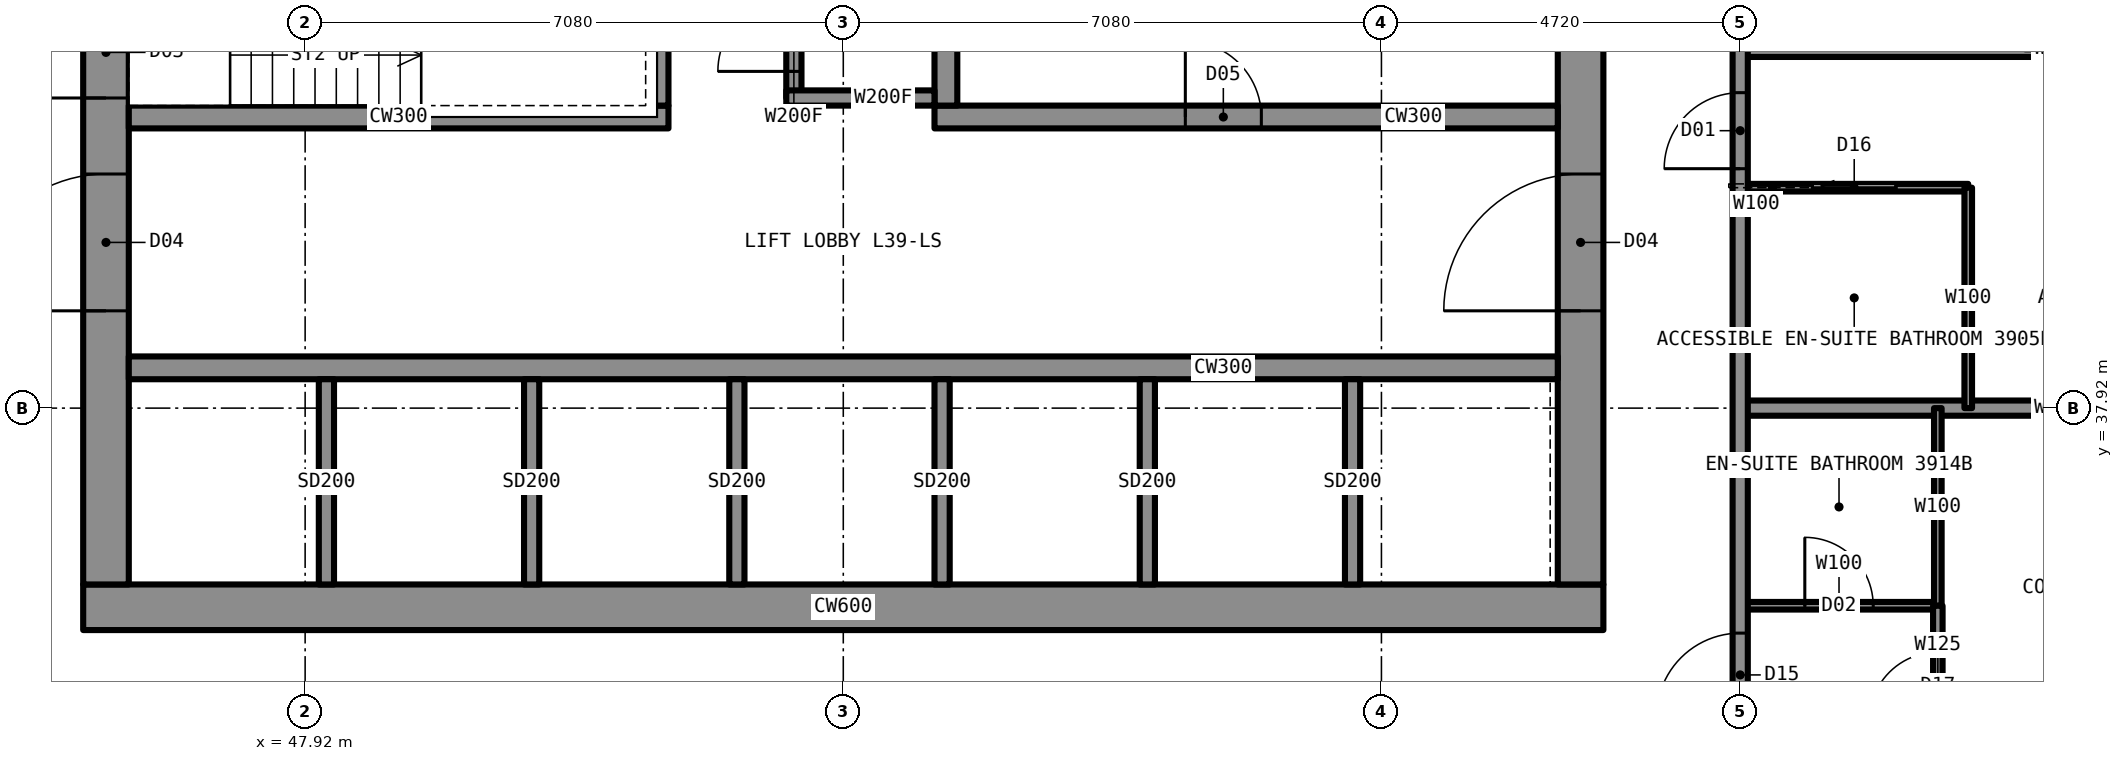
"""IFC4 building model, lengths in metres.
Left out: names, types, materials, properties, quantities, classifications, styles, units other than length and angle.
Written with IfcOpenShell. Run it as: python <this file> out.ifc"""

import sys

from ifc_helpers import new_model, si_unit, direction, frame, frame_2d, origin, place, context, subcontext, project, spatial, rectangle, extrude, element, fill, save


model = new_model("IFC4")
c1 = context("Model", 3, precision=1e-05, world=origin(), true_north=direction((0.0, 1.0)))
c2 = subcontext(c1, "Body", "Model", "MODEL_VIEW")
j1 = project(units=[si_unit("LENGTHUNIT", "METRE"), si_unit("PLANEANGLEUNIT", "RADIAN")], contexts=[c1])
p1 = place(None, origin())
s1 = spatial("IfcSite", under=j1, at=p1, CompositionType="ELEMENT")
p2 = place(p1, origin())
s2 = spatial("IfcBuilding", under=s1, at=p2, CompositionType="ELEMENT")
p3 = place(p2, frame((0.0, 0.0, 145.9)))
s3 = spatial("IfcBuildingStorey", under=s2, at=p3, CompositionType="ELEMENT", Elevation=145.9)
p4 = place(p3, frame((45.0, 35.3, 0.0), z_axis=(0.0, 0.0, 1.0), x_axis=(1.0, 0.0, 0.0)))
e1 = element("IfcWall", 1, at=p4, inside=s3, PredefinedType="SHEAR", context=c2, shape_type="SweptSolid", body=[
    extrude(rectangle(XDim=20.0, YDim=0.6, at=frame_2d((10.0, 0.0))), origin(), (0.0, 0.0, 1.0), 3.5),
])
p5 = place(p3, frame((64.7, 35.6, 0.0), z_axis=(0.0, 0.0, 1.0), x_axis=(0.0, 1.0, 0.0)))
e2 = element("IfcWall", 2, at=p5, inside=s3, PredefinedType="SHEAR", context=c2, shape_type="SweptSolid", body=[
    extrude(rectangle(XDim=18.8, YDim=0.6, at=frame_2d((9.4, 0.0))), origin(), (0.0, 0.0, 1.0), 3.5),
])
p6 = place(p5, frame((13.4, 0.0, 0.0)))
e3 = element("IfcOpeningElement", 3, at=p6, cuts=e2, PredefinedType="OPENING", context=c2, shape_type="SweptSolid", body=[
    extrude(rectangle(XDim=1.8, YDim=2.2, at=frame_2d((0.9, 1.1))), frame((0.0, 0.31, 0.0), z_axis=(0.0, -1.0, 0.0), x_axis=(1.0, 0.0, 0.0)), (0.0, 0.0, 1.0), 0.62),
])
p7 = place(p5, frame((3.6, 0.0, 0.0)))
e4 = element("IfcOpeningElement", 4, at=p7, cuts=e2, PredefinedType="OPENING", context=c2, shape_type="SweptSolid", body=[
    extrude(rectangle(XDim=1.8, YDim=2.2, at=frame_2d((0.9, 1.1))), frame((0.0, 0.31, 0.0), z_axis=(0.0, -1.0, 0.0), x_axis=(1.0, 0.0, 0.0)), (0.0, 0.0, 1.0), 0.62),
])
p8 = place(p3, frame((45.3, 35.6, 0.0), z_axis=(0.0, 0.0, 1.0), x_axis=(0.0, 1.0, 0.0)))
e5 = element("IfcWall", 5, at=p8, inside=s3, PredefinedType="SHEAR", context=c2, shape_type="SweptSolid", body=[
    extrude(rectangle(XDim=18.8, YDim=0.6, at=frame_2d((9.4, 0.0))), origin(), (0.0, 0.0, 1.0), 3.5),
])
p9 = place(p8, frame((13.4, 0.0, 0.0)))
e6 = element("IfcOpeningElement", 6, at=p9, cuts=e5, PredefinedType="OPENING", context=c2, shape_type="SweptSolid", body=[
    extrude(rectangle(XDim=1.8, YDim=2.2, at=frame_2d((0.9, 1.1))), frame((0.0, 0.31, 0.0), z_axis=(0.0, -1.0, 0.0), x_axis=(1.0, 0.0, 0.0)), (0.0, 0.0, 1.0), 0.62),
])
p10 = place(p8, frame((3.6, 0.0, 0.0)))
e7 = element("IfcOpeningElement", 7, at=p10, cuts=e5, PredefinedType="OPENING", context=c2, shape_type="SweptSolid", body=[
    extrude(rectangle(XDim=1.8, YDim=2.2, at=frame_2d((0.9, 1.1))), frame((0.0, 0.31, 0.0), z_axis=(0.0, -1.0, 0.0), x_axis=(1.0, 0.0, 0.0)), (0.0, 0.0, 1.0), 0.62),
])
p11 = place(p8, frame((6.4, 0.0, 0.0)))
e8 = element("IfcOpeningElement", 8, at=p11, cuts=e5, PredefinedType="OPENING", context=c2, shape_type="SweptSolid", body=[
    extrude(rectangle(XDim=1.2, YDim=2.2, at=frame_2d((0.6, 1.1))), frame((0.0, 0.31, 0.0), z_axis=(0.0, -1.0, 0.0), x_axis=(1.0, 0.0, 0.0)), (0.0, 0.0, 1.0), 0.62),
])
p12 = place(p3, frame((45.6, 38.45, 0.0), z_axis=(0.0, 0.0, 1.0), x_axis=(1.0, 0.0, 0.0)))
e9 = element("IfcWall", 9, at=p12, inside=s3, PredefinedType="SHEAR", context=c2, shape_type="SweptSolid", body=[
    extrude(rectangle(XDim=18.8, YDim=0.3, at=frame_2d((9.4, 0.0))), origin(), (0.0, 0.0, 1.0), 3.5),
])
p13 = place(p3, frame((45.6, 41.75, 0.0), z_axis=(0.0, 0.0, 1.0), x_axis=(1.0, 0.0, 0.0)))
e10 = element("IfcWall", 10, at=p13, inside=s3, PredefinedType="SHEAR", context=c2, shape_type="SweptSolid", body=[
    extrude(rectangle(XDim=7.1, YDim=0.3, at=frame_2d((3.55, 0.0))), origin(), (0.0, 0.0, 1.0), 3.5),
])
p14 = place(p3, frame((56.2, 41.75, 0.0), z_axis=(0.0, 0.0, 1.0), x_axis=(1.0, 0.0, 0.0)))
e11 = element("IfcWall", 11, at=p14, inside=s3, PredefinedType="SHEAR", context=c2, shape_type="SweptSolid", body=[
    extrude(rectangle(XDim=8.2, YDim=0.3, at=frame_2d((4.1, 0.0))), origin(), (0.0, 0.0, 1.0), 3.5),
])
p15 = place(p14, frame((3.3, 0.0, 0.0)))
e12 = element("IfcOpeningElement", 12, at=p15, cuts=e11, PredefinedType="OPENING", context=c2, shape_type="SweptSolid", body=[
    extrude(rectangle(XDim=1.0, YDim=2.1, at=frame_2d((0.5, 1.05))), frame((0.0, 0.16, 0.0), z_axis=(0.0, -1.0, 0.0), x_axis=(1.0, 0.0, 0.0)), (0.0, 0.0, 1.0), 0.32),
])
p16 = place(p3, frame((52.55, 41.9, 0.0), z_axis=(0.0, 0.0, 1.0), x_axis=(0.0, 1.0, 0.0)))
e13 = element("IfcWall", 13, at=p16, inside=s3, PredefinedType="SHEAR", context=c2, shape_type="SweptSolid", body=[
    extrude(rectangle(XDim=6.2, YDim=0.3, at=frame_2d((3.1, 0.0))), origin(), (0.0, 0.0, 1.0), 3.5),
])
p17 = place(p16, frame((4.125, 0.0, 0.0)))
e14 = element("IfcOpeningElement", 14, at=p17, cuts=e13, PredefinedType="OPENING", context=c2, shape_type="SweptSolid", body=[
    extrude(rectangle(XDim=1.2, YDim=2.2, at=frame_2d((0.6, 1.1))), frame((0.0, 0.16, 0.0), z_axis=(0.0, -1.0, 0.0), x_axis=(1.0, 0.0, 0.0)), (0.0, 0.0, 1.0), 0.32),
])
p18 = place(p3, frame((56.35, 41.9, 0.0), z_axis=(0.0, 0.0, 1.0), x_axis=(0.0, 1.0, 0.0)))
e15 = element("IfcWall", 15, at=p18, inside=s3, PredefinedType="SHEAR", context=c2, shape_type="SweptSolid", body=[
    extrude(rectangle(XDim=9.5, YDim=0.3, at=frame_2d((4.75, 0.0))), origin(), (0.0, 0.0, 1.0), 3.5),
])
p19 = place(p18, frame((7.1, 0.0, 0.0)))
e16 = element("IfcOpeningElement", 16, at=p19, cuts=e15, PredefinedType="OPENING", context=c2, shape_type="SweptSolid", body=[
    extrude(rectangle(XDim=1.8, YDim=2.2, at=frame_2d((0.9, 1.1))), frame((0.0, 0.16, 0.0), z_axis=(0.0, -1.0, 0.0), x_axis=(1.0, 0.0, 0.0)), (0.0, 0.0, 1.0), 0.32),
])
p20 = place(p3, frame((66.8, 42.64, 0.0), z_axis=(0.0, 0.0, 1.0), x_axis=(1.0, 0.0, 0.0)))
e17 = element("IfcWall", 17, at=p20, inside=s3, PredefinedType="PARTITIONING", context=c2, shape_type="SweptSolid", body=[
    extrude(rectangle(XDim=8.5, YDim=0.2, at=frame_2d((4.25, 0.0))), origin(), (0.0, 0.0, 1.0), 2.731),
])
p21 = place(p3, frame((66.8, 40.82, 0.0), z_axis=(0.0, 0.0, 1.0), x_axis=(1.0, 0.0, 0.0)))
e18 = element("IfcWall", 18, at=p21, inside=s3, PredefinedType="PARTITIONING", context=c2, shape_type="SweptSolid", body=[
    extrude(rectangle(XDim=3.0, YDim=0.1, at=frame_2d((1.5, 0.0))), origin(), (0.0, 0.0, 1.0), 3.33),
])
p22 = place(p21, frame((0.95, 0.0, 0.0)))
e19 = element("IfcOpeningElement", 19, at=p22, cuts=e18, PredefinedType="OPENING", context=c2, shape_type="SweptSolid", body=[
    extrude(rectangle(XDim=1.1, YDim=2.1, at=frame_2d((0.55, 1.05))), frame((0.0, 0.06, 0.0), z_axis=(0.0, -1.0, 0.0), x_axis=(1.0, 0.0, 0.0)), (0.0, 0.0, 1.0), 0.12),
])
p23 = place(p3, frame((66.8, 37.92, 0.0), z_axis=(0.0, 0.0, 1.0), x_axis=(1.0, 0.0, 0.0)))
e20 = element("IfcWall", 20, at=p23, inside=s3, PredefinedType="PARTITIONING", context=c2, shape_type="SweptSolid", body=[
    extrude(rectangle(XDim=8.5, YDim=0.2, at=frame_2d((4.25, 0.0))), origin(), (0.0, 0.0, 1.0), 2.573),
])
p24 = place(p3, frame((66.8, 35.32, 0.0), z_axis=(0.0, 0.0, 1.0), x_axis=(1.0, 0.0, 0.0)))
e21 = element("IfcWall", 21, at=p24, inside=s3, PredefinedType="PARTITIONING", context=c2, shape_type="SweptSolid", body=[
    extrude(rectangle(XDim=2.6, YDim=0.1, at=frame_2d((1.3, 0.0))), origin(), (0.0, 0.0, 1.0), 3.33),
])
p25 = place(p24, frame((0.85, 0.0, 0.0)))
e22 = element("IfcOpeningElement", 22, at=p25, cuts=e21, PredefinedType="OPENING", context=c2, shape_type="SweptSolid", body=[
    extrude(rectangle(XDim=0.9, YDim=2.1, at=frame_2d((0.45, 1.05))), frame((0.0, 0.06, 0.0), z_axis=(0.0, -1.0, 0.0), x_axis=(1.0, 0.0, 0.0)), (0.0, 0.0, 1.0), 0.12),
])
p26 = place(p3, frame((66.8, 33.2, 0.0), z_axis=(0.0, 0.0, 1.0), x_axis=(0.0, 1.0, 0.0)))
e23 = element("IfcWall", 23, at=p26, inside=s3, PredefinedType="PARTITIONING", context=c2, shape_type="SweptSolid", body=[
    extrude(rectangle(XDim=23.6, YDim=0.2, at=frame_2d((11.8, 0.0))), origin(), (0.0, 0.0, 1.0), 3.33),
])
p27 = place(p26, frame((7.87, 0.0, 0.0)))
e24 = element("IfcOpeningElement", 24, at=p27, cuts=e23, PredefinedType="OPENING", context=c2, shape_type="SweptSolid", body=[
    extrude(rectangle(XDim=1.0, YDim=2.2, at=frame_2d((0.5, 1.1))), frame((0.0, 0.11, 0.0), z_axis=(0.0, -1.0, 0.0), x_axis=(1.0, 0.0, 0.0)), (0.0, 0.0, 1.0), 0.22),
])
p28 = place(p26, frame((11.7, 0.0, 0.0)))
e25 = element("IfcOpeningElement", 25, at=p28, cuts=e23, PredefinedType="OPENING", context=c2, shape_type="SweptSolid", body=[
    extrude(rectangle(XDim=1.0, YDim=2.2, at=frame_2d((0.5, 1.1))), frame((0.0, 0.11, 0.0), z_axis=(0.0, -1.0, 0.0), x_axis=(1.0, 0.0, 0.0)), (0.0, 0.0, 1.0), 0.22),
])
p29 = place(p26, frame((14.56, 0.0, 0.0)))
e26 = element("IfcOpeningElement", 26, at=p29, cuts=e23, PredefinedType="OPENING", context=c2, shape_type="SweptSolid", body=[
    extrude(rectangle(XDim=1.0, YDim=2.2, at=frame_2d((0.5, 1.1))), frame((0.0, 0.11, 0.0), z_axis=(0.0, -1.0, 0.0), x_axis=(1.0, 0.0, 0.0)), (0.0, 0.0, 1.0), 0.22),
])
p30 = place(p26, frame((21.84, 0.0, 0.0)))
e27 = element("IfcOpeningElement", 27, at=p30, cuts=e23, PredefinedType="OPENING", context=c2, shape_type="SweptSolid", body=[
    extrude(rectangle(XDim=1.1, YDim=2.2, at=frame_2d((0.55, 1.1))), frame((0.0, 0.11, 0.0), z_axis=(0.0, -1.0, 0.0), x_axis=(1.0, 0.0, 0.0)), (0.0, 0.0, 1.0), 0.22),
])
p31 = place(p26, frame((0.66, 0.0, 0.0)))
e28 = element("IfcOpeningElement", 28, at=p31, cuts=e23, PredefinedType="OPENING", context=c2, shape_type="SweptSolid", body=[
    extrude(rectangle(XDim=1.1, YDim=2.2, at=frame_2d((0.55, 1.1))), frame((0.0, 0.11, 0.0), z_axis=(0.0, -1.0, 0.0), x_axis=(1.0, 0.0, 0.0)), (0.0, 0.0, 1.0), 0.22),
])
p32 = place(p3, frame((69.4, 35.32, 0.0), z_axis=(0.0, 0.0, 1.0), x_axis=(0.0, 1.0, 0.0)))
e29 = element("IfcWall", 29, at=p32, inside=s3, PredefinedType="PARTITIONING", context=c2, shape_type="SweptSolid", body=[
    extrude(rectangle(XDim=2.6, YDim=0.1, at=frame_2d((1.3, 0.0))), origin(), (0.0, 0.0, 1.0), 3.33),
])
p33 = place(p3, frame((69.4, 33.2, 0.0), z_axis=(0.0, 0.0, 1.0), x_axis=(0.0, 1.0, 0.0)))
e30 = element("IfcWall", 30, at=p33, inside=s3, PredefinedType="PARTITIONING", context=c2, shape_type="SweptSolid", body=[
    extrude(rectangle(XDim=2.12, YDim=0.125, at=frame_2d((1.06, 0.0))), origin(), (0.0, 0.0, 1.0), 3.33),
])
p34 = place(p33, frame((0.61, 0.0, 0.0)))
e31 = element("IfcOpeningElement", 31, at=p34, cuts=e30, PredefinedType="OPENING", context=c2, shape_type="SweptSolid", body=[
    extrude(rectangle(XDim=0.9, YDim=2.2, at=frame_2d((0.45, 1.1))), frame((0.0, 0.073, 0.0), z_axis=(0.0, -1.0, 0.0), x_axis=(1.0, 0.0, 0.0)), (0.0, 0.0, 1.0), 0.145),
])
p35 = place(p3, frame((69.8, 37.92, 0.0), z_axis=(0.0, 0.0, 1.0), x_axis=(0.0, 1.0, 0.0)))
e32 = element("IfcWall", 32, at=p35, inside=s3, PredefinedType="PARTITIONING", context=c2, shape_type="SweptSolid", body=[
    extrude(rectangle(XDim=2.9, YDim=0.1, at=frame_2d((1.45, 0.0))), origin(), (0.0, 0.0, 1.0), 3.33),
])
p36 = place(p3, frame((54.35, 42.0, 0.0), z_axis=(0.0, 0.0, 1.0), x_axis=(0.0, 1.0, 0.0)))
e33 = element("IfcWall", 33, at=p36, inside=s3, PredefinedType="PARTITIONING", context=c2, shape_type="SweptSolid", body=[
    extrude(rectangle(XDim=1.7, YDim=0.2, at=frame_2d((0.85, 0.0))), origin(), (0.0, 0.0, 1.0), 3.33),
])
p37 = place(p36, frame((0.35, 0.0, 0.0)))
e34 = element("IfcOpeningElement", 34, at=p37, cuts=e33, PredefinedType="OPENING", context=c2, shape_type="SweptSolid", body=[
    extrude(rectangle(XDim=1.0, YDim=2.1, at=frame_2d((0.5, 1.05))), frame((0.0, 0.11, 0.0), z_axis=(0.0, -1.0, 0.0), x_axis=(1.0, 0.0, 0.0)), (0.0, 0.0, 1.0), 0.22),
])
p38 = place(p3, frame((54.25, 42.0, 0.0), z_axis=(0.0, 0.0, 1.0), x_axis=(1.0, 0.0, 0.0)))
e35 = element("IfcWall", 35, at=p38, inside=s3, PredefinedType="PARTITIONING", context=c2, shape_type="SweptSolid", body=[
    extrude(rectangle(XDim=1.95, YDim=0.2, at=frame_2d((0.975, 0.0))), origin(), (0.0, 0.0, 1.0), 3.33),
])
for number, where, z_axis, x_axis in (
    (36, (48.2, 35.6, 0.0), (0.0, 0.0, 1.0), (0.0, 1.0, 0.0)),
    (37, (50.9, 35.6, 0.0), (0.0, 0.0, 1.0), (0.0, 1.0, 0.0)),
    (38, (53.6, 35.6, 0.0), (0.0, 0.0, 1.0), (0.0, 1.0, 0.0)),
    (39, (56.3, 35.6, 0.0), (0.0, 0.0, 1.0), (0.0, 1.0, 0.0)),
    (40, (59.0, 35.6, 0.0), (0.0, 0.0, 1.0), (0.0, 1.0, 0.0)),
    (41, (61.7, 35.6, 0.0), (0.0, 0.0, 1.0), (0.0, 1.0, 0.0)),
):
    element("IfcWall", number, at=place(p3, frame(where, z_axis=z_axis, x_axis=x_axis)), inside=s3, PredefinedType="PARTITIONING", context=c2, shape_type="SweptSolid", body=[
        extrude(rectangle(XDim=2.7, YDim=0.2, at=frame_2d((1.35, 0.0))), origin(), (0.0, 0.0, 1.0), 3.33),
    ])
p39 = place(p27, origin())
e42 = element("IfcDoor", 42, at=p39, inside=s3, OperationType="SINGLE_SWING_LEFT", PredefinedType="DOOR", context=c2, shape_type="SweptSolid", body=[
    extrude(rectangle(XDim=1.0, YDim=2.2, at=frame_2d((0.5, 1.1))), frame((0.0, 0.025, 0.0), z_axis=(0.0, -1.0, 0.0), x_axis=(1.0, 0.0, 0.0)), (0.0, 0.0, 1.0), 0.05),
])
fill(e24, e42)
p40 = place(p22, origin())
e43 = element("IfcDoor", 43, at=p40, inside=s3, OperationType="SLIDING_TO_LEFT", PredefinedType="DOOR", context=c2, shape_type="SweptSolid", body=[
    extrude(rectangle(XDim=1.1, YDim=2.1, at=frame_2d((0.55, 1.05))), frame((0.0, 0.025, 0.0), z_axis=(0.0, -1.0, 0.0), x_axis=(1.0, 0.0, 0.0)), (0.0, 0.0, 1.0), 0.05),
])
fill(e19, e43)
p41 = place(p25, origin())
e44 = element("IfcDoor", 44, at=p41, inside=s3, OperationType="SINGLE_SWING_RIGHT", PredefinedType="DOOR", context=c2, shape_type="SweptSolid", body=[
    extrude(rectangle(XDim=0.9, YDim=2.1, at=frame_2d((0.45, 1.05))), frame((0.0, 0.025, 0.0), z_axis=(0.0, -1.0, 0.0), x_axis=(1.0, 0.0, 0.0)), (0.0, 0.0, 1.0), 0.05),
])
fill(e22, e44)
p42 = place(p31, origin())
e45 = element("IfcDoor", 45, at=p42, inside=s3, OperationType="SINGLE_SWING_LEFT", PredefinedType="DOOR", context=c2, shape_type="SweptSolid", body=[
    extrude(rectangle(XDim=1.1, YDim=2.2, at=frame_2d((0.55, 1.1))), frame((0.0, 0.025, 0.0), z_axis=(0.0, -1.0, 0.0), x_axis=(1.0, 0.0, 0.0)), (0.0, 0.0, 1.0), 0.05),
])
fill(e28, e45)
p43 = place(p34, origin())
e46 = element("IfcDoor", 46, at=p43, inside=s3, OperationType="SINGLE_SWING_LEFT", PredefinedType="DOOR", context=c2, shape_type="SweptSolid", body=[
    extrude(rectangle(XDim=0.9, YDim=2.2, at=frame_2d((0.45, 1.1))), frame((0.0, 0.025, 0.0), z_axis=(0.0, -1.0, 0.0), x_axis=(1.0, 0.0, 0.0)), (0.0, 0.0, 1.0), 0.05),
])
fill(e31, e46)
p44 = place(p37, origin())
e47 = element("IfcDoor", 47, at=p44, inside=s3, OperationType="SINGLE_SWING_LEFT", PredefinedType="DOOR", context=c2, shape_type="SweptSolid", body=[
    extrude(rectangle(XDim=1.0, YDim=2.1, at=frame_2d((0.5, 1.05))), frame((0.0, 0.025, 0.0), z_axis=(0.0, -1.0, 0.0), x_axis=(1.0, 0.0, 0.0)), (0.0, 0.0, 1.0), 0.05),
])
fill(e34, e47)
p45 = place(p10, origin())
e48 = element("IfcDoor", 48, at=p45, inside=s3, OperationType="DOUBLE_DOOR_SINGLE_SWING", PredefinedType="DOOR", context=c2, shape_type="SweptSolid", body=[
    extrude(rectangle(XDim=1.8, YDim=2.2, at=frame_2d((0.9, 1.1))), frame((0.0, 0.025, 0.0), z_axis=(0.0, -1.0, 0.0), x_axis=(1.0, 0.0, 0.0)), (0.0, 0.0, 1.0), 0.05),
])
fill(e7, e48)
p46 = place(p7, origin())
e49 = element("IfcDoor", 49, at=p46, inside=s3, OperationType="DOUBLE_DOOR_SINGLE_SWING", PredefinedType="DOOR", context=c2, shape_type="SweptSolid", body=[
    extrude(rectangle(XDim=1.8, YDim=2.2, at=frame_2d((0.9, 1.1))), frame((0.0, 0.025, 0.0), z_axis=(0.0, -1.0, 0.0), x_axis=(1.0, 0.0, 0.0)), (0.0, 0.0, 1.0), 0.05),
])
fill(e4, e49)
p47 = place(p11, origin())
e50 = element("IfcDoor", 50, at=p47, inside=s3, OperationType="SINGLE_SWING_LEFT", PredefinedType="DOOR", context=c2, shape_type="SweptSolid", body=[
    extrude(rectangle(XDim=1.2, YDim=2.2, at=frame_2d((0.6, 1.1))), frame((0.0, 0.025, 0.0), z_axis=(0.0, -1.0, 0.0), x_axis=(1.0, 0.0, 0.0)), (0.0, 0.0, 1.0), 0.05),
])
fill(e8, e50)
p48 = place(p15, origin())
e51 = element("IfcDoor", 51, at=p48, inside=s3, OperationType="SINGLE_SWING_LEFT", PredefinedType="DOOR", context=c2, shape_type="SweptSolid", body=[
    extrude(rectangle(XDim=1.0, YDim=2.1, at=frame_2d((0.5, 1.05))), frame((0.0, 0.025, 0.0), z_axis=(0.0, -1.0, 0.0), x_axis=(1.0, 0.0, 0.0)), (0.0, 0.0, 1.0), 0.05),
])
fill(e12, e51)
save(model, sys.argv[1])
